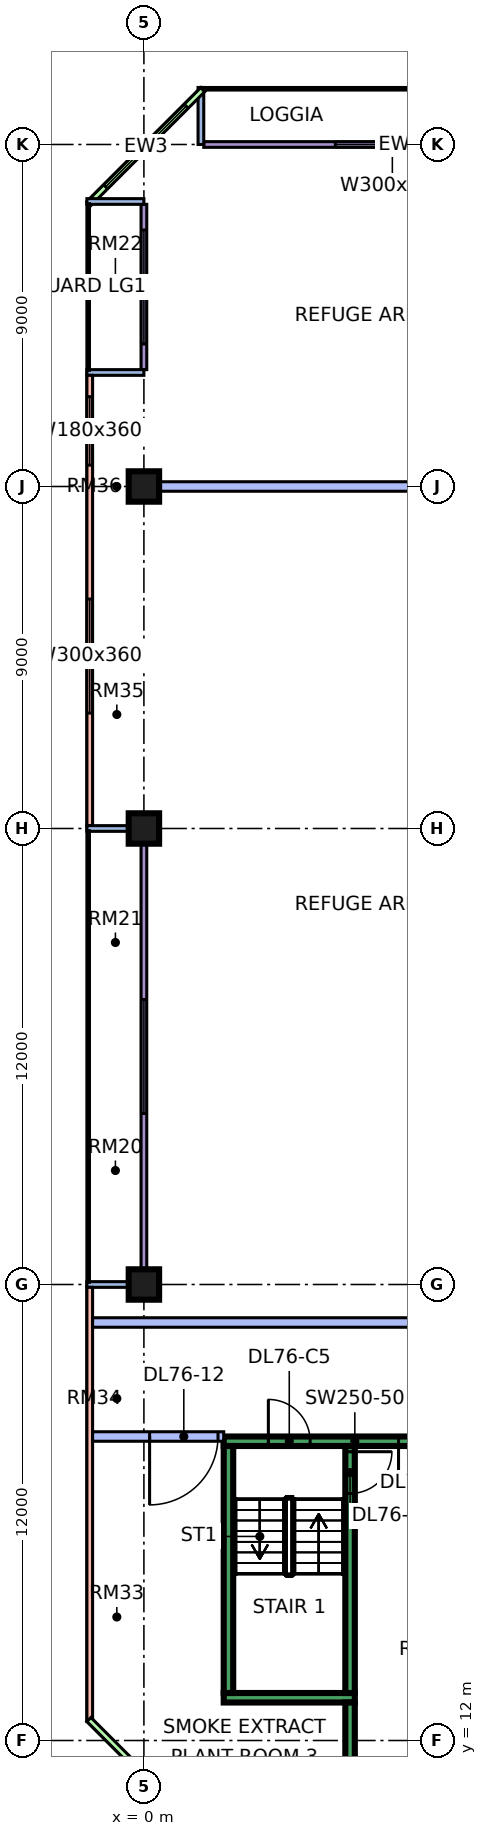
"""IFC4 building model, lengths in metres.
Left out: names, types, materials, properties, quantities, classifications, styles, units other than length and angle.
Written with IfcOpenShell. Run it as: python <this file> out.ifc"""

import sys

from ifc_helpers import new_model, si_unit, direction, frame, frame_2d, origin, origin_2d, place, context, subcontext, project, spatial, rectangle, extrude, element, fill, save


model = new_model("IFC4")
c1 = context("Model", 3, precision=1e-05, world=origin(), true_north=direction((0.0, 1.0)))
c2 = subcontext(c1, "Body", "Model", "MODEL_VIEW")
j1 = project(units=[si_unit("LENGTHUNIT", "METRE"), si_unit("PLANEANGLEUNIT", "RADIAN")], contexts=[c1])
p1 = place(None, origin())
s1 = spatial("IfcSite", under=j1, at=p1, CompositionType="ELEMENT")
p2 = place(p1, origin())
s2 = spatial("IfcBuilding", under=s1, at=p2, CompositionType="ELEMENT")
p3 = place(p2, frame((0.0, 0.0, 322.15)))
s3 = spatial("IfcBuildingStorey", under=s2, at=p3, CompositionType="ELEMENT", Elevation=322.15)
for number, where, z_axis, x_axis in (
    (1, (0.0, 24.0, 0.0), (0.0, 0.0, 1.0), (1.0, 0.0, 0.0)),
    (2, (0.0, 36.0, 0.0), (0.0, 0.0, 1.0), (1.0, 0.0, 0.0)),
):
    element("IfcColumn", number, at=place(p3, frame(where, z_axis=z_axis, x_axis=x_axis)), inside=s3, PredefinedType="COLUMN", context=c2, shape_type="SweptSolid", body=[
        extrude(rectangle(XDim=0.8, YDim=0.8, at=origin_2d()), origin(), (0.0, 0.0, 1.0), 5.5),
    ])
p4 = place(p3, frame((0.0, 45.0, 0.0), z_axis=(0.0, 0.0, 1.0), x_axis=(1.0, 0.0, 0.0)))
e3 = element("IfcColumn", 3, at=p4, inside=s3, PredefinedType="COLUMN", context=c2, shape_type="SweptSolid", body=[
    extrude(rectangle(XDim=0.8, YDim=0.8, at=origin_2d()), origin(), (0.0, 0.0, 1.0), 5.5),
])
p5 = place(p3, frame((2.1, 19.875, 0.0), z_axis=(0.0, 0.0, 1.0), x_axis=(1.0, 0.0, 0.0)))
e4 = element("IfcWall", 4, at=p5, inside=s3, PredefinedType="SHEAR", context=c2, shape_type="SweptSolid", body=[
    extrude(rectangle(XDim=6.9, YDim=0.25, at=frame_2d((3.45, 0.0))), origin(), (0.0, 0.0, 1.0), 5.5),
])
p6 = place(p5, frame((1.175, 0.0, 0.0)))
e5 = element("IfcOpeningElement", 5, at=p6, cuts=e4, PredefinedType="OPENING", context=c2, shape_type="SweptSolid", body=[
    extrude(rectangle(XDim=1.1, YDim=2.2, at=frame_2d((0.55, 1.1))), frame((0.0, 0.135, 0.0), z_axis=(0.0, -1.0, 0.0), x_axis=(1.0, 0.0, 0.0)), (0.0, 0.0, 1.0), 0.27),
])
p7 = place(p5, frame((4.6, 0.0, 0.0)))
e6 = element("IfcOpeningElement", 6, at=p7, cuts=e4, PredefinedType="OPENING", context=c2, shape_type="SweptSolid", body=[
    extrude(rectangle(XDim=1.2, YDim=2.2, at=frame_2d((0.6, 1.1))), frame((0.0, 0.135, 0.0), z_axis=(0.0, -1.0, 0.0), x_axis=(1.0, 0.0, 0.0)), (0.0, 0.0, 1.0), 0.27),
])
p8 = place(p3, frame((2.1, 13.125, 0.0), z_axis=(0.0, 0.0, 1.0), x_axis=(1.0, 0.0, 0.0)))
e7 = element("IfcWall", 7, at=p8, inside=s3, PredefinedType="SHEAR", context=c2, shape_type="SweptSolid", body=[
    extrude(rectangle(XDim=3.45, YDim=0.25, at=frame_2d((1.725, 0.0))), origin(), (0.0, 0.0, 1.0), 5.5),
])
p9 = place(p3, frame((2.225, 13.25, 0.0), z_axis=(0.0, 0.0, 1.0), x_axis=(0.0, 1.0, 0.0)))
e8 = element("IfcWall", 8, at=p9, inside=s3, PredefinedType="SHEAR", context=c2, shape_type="SweptSolid", body=[
    extrude(rectangle(XDim=6.5, YDim=0.25, at=frame_2d((3.25, 0.0))), origin(), (0.0, 0.0, 1.0), 5.5),
])
p10 = place(p3, frame((5.425, 13.25, 0.0), z_axis=(0.0, 0.0, 1.0), x_axis=(0.0, 1.0, 0.0)))
e9 = element("IfcWall", 9, at=p10, inside=s3, PredefinedType="SHEAR", context=c2, shape_type="SweptSolid", body=[
    extrude(rectangle(XDim=6.5, YDim=0.25, at=frame_2d((3.25, 0.0))), origin(), (0.0, 0.0, 1.0), 5.5),
])
p11 = place(p10, frame((5.25, 0.0, 0.0)))
e10 = element("IfcOpeningElement", 10, at=p11, cuts=e9, PredefinedType="OPENING", context=c2, shape_type="SweptSolid", body=[
    extrude(rectangle(XDim=1.1, YDim=2.2, at=frame_2d((0.55, 1.1))), frame((0.0, 0.135, 0.0), z_axis=(0.0, -1.0, 0.0), x_axis=(1.0, 0.0, 0.0)), (0.0, 0.0, 1.0), 0.27),
])
p12 = place(p3, frame((5.425, 9.0, 0.0), z_axis=(0.0, 0.0, 1.0), x_axis=(0.0, 1.0, 0.0)))
e11 = element("IfcWall", 11, at=p12, inside=s3, PredefinedType="SHEAR", context=c2, shape_type="SweptSolid", body=[
    extrude(rectangle(XDim=4.0, YDim=0.25, at=frame_2d((2.0, 0.0))), origin(), (0.0, 0.0, 1.0), 5.5),
])
p13 = place(p3, frame((11.925, 54.0, 0.0), z_axis=(0.0, 0.0, 1.0), x_axis=(-1.0, 0.0, 0.0)))
e12 = element("IfcWall", 12, at=p13, inside=s3, PredefinedType="SOLIDWALL", context=c2, shape_type="SweptSolid", body=[
    extrude(rectangle(XDim=10.35, YDim=0.15, at=frame_2d((5.175, 0.0))), origin(), (0.0, 0.0, 1.0), 5.05),
])
p14 = place(p13, frame((3.887, 0.0, 0.45)))
e13 = element("IfcOpeningElement", 13, at=p14, cuts=e12, PredefinedType="OPENING", context=c2, shape_type="SweptSolid", body=[
    extrude(rectangle(XDim=3.0, YDim=3.6, at=frame_2d((1.5, 1.8))), frame((0.0, 0.085, 0.0), z_axis=(0.0, -1.0, 0.0), x_axis=(1.0, 0.0, 0.0)), (0.0, 0.0, 1.0), 0.17),
])
p15 = place(p3, frame((1.5, 55.5, 0.0), z_axis=(0.0, 0.0, 1.0), x_axis=(0.0, -1.0, 0.0)))
e14 = element("IfcWall", 14, at=p15, inside=s3, PredefinedType="SOLIDWALL", context=c2, shape_type="SweptSolid", body=[
    extrude(rectangle(XDim=1.5, YDim=0.15, at=frame_2d((0.75, 0.0))), origin(), (0.0, 0.0, 1.0), 5.05),
])
p16 = place(p3, frame((1.553, 55.447, 0.0), z_axis=(0.0, 0.0, 1.0), x_axis=(-0.707106781187, -0.707106781187, 0.0)))
e15 = element("IfcWall", 15, at=p16, inside=s3, PredefinedType="SOLIDWALL", context=c2, shape_type="SweptSolid", body=[
    extrude(rectangle(XDim=4.243, YDim=0.15, at=frame_2d((2.121, 0.0))), origin(), (0.0, 0.0, 1.0), 5.05),
])
p17 = place(p16, frame((0.621, 0.0, 0.45)))
e16 = element("IfcOpeningElement", 16, at=p17, cuts=e15, PredefinedType="OPENING", context=c2, shape_type="SweptSolid", body=[
    extrude(rectangle(XDim=3.0, YDim=3.6, at=frame_2d((1.5, 1.8))), frame((0.0, 0.085, 0.0), z_axis=(0.0, -1.0, 0.0), x_axis=(1.0, 0.0, 0.0)), (0.0, 0.0, 1.0), 0.17),
])
p18 = place(p3, frame((0.0, 52.425, 0.0), z_axis=(0.0, 0.0, 1.0), x_axis=(0.0, -1.0, 0.0)))
e17 = element("IfcWall", 17, at=p18, inside=s3, PredefinedType="SOLIDWALL", context=c2, shape_type="SweptSolid", body=[
    extrude(rectangle(XDim=4.35, YDim=0.15, at=frame_2d((2.175, 0.0))), origin(), (0.0, 0.0, 1.0), 5.05),
])
p19 = place(p18, frame((0.675, 0.0, 0.45)))
e18 = element("IfcOpeningElement", 18, at=p19, cuts=e17, PredefinedType="OPENING", context=c2, shape_type="SweptSolid", body=[
    extrude(rectangle(XDim=3.0, YDim=3.6, at=frame_2d((1.5, 1.8))), frame((0.0, 0.085, 0.0), z_axis=(0.0, -1.0, 0.0), x_axis=(1.0, 0.0, 0.0)), (0.0, 0.0, 1.0), 0.17),
])
for number, where, z_axis, x_axis in (
    (19, (-1.5, 52.5, 0.0), (0.0, 0.0, 1.0), (1.0, 0.0, 0.0)),
    (20, (-1.5, 48.0, 0.0), (0.0, 0.0, 1.0), (1.0, 0.0, 0.0)),
):
    element("IfcWall", number, at=place(p3, frame(where, z_axis=z_axis, x_axis=x_axis)), inside=s3, PredefinedType="SOLIDWALL", context=c2, shape_type="SweptSolid", body=[
        extrude(rectangle(XDim=1.5, YDim=0.15, at=frame_2d((0.75, 0.0))), origin(), (0.0, 0.0, 1.0), 5.05),
    ])
p20 = place(p3, frame((-1.425, 47.925, 0.0), z_axis=(0.0, 0.0, 1.0), x_axis=(0.0, -1.0, 0.0)))
e21 = element("IfcWall", 21, at=p20, inside=s3, PredefinedType="SOLIDWALL", context=c2, shape_type="SweptSolid", body=[
    extrude(rectangle(XDim=11.85, YDim=0.15, at=frame_2d((5.925, 0.0))), origin(), (0.0, 0.0, 1.0), 5.05),
])
p21 = place(p20, frame((0.562, 0.0, 0.45)))
e22 = element("IfcOpeningElement", 22, at=p21, cuts=e21, PredefinedType="OPENING", context=c2, shape_type="SweptSolid", body=[
    extrude(rectangle(XDim=1.8, YDim=3.6, at=frame_2d((0.9, 1.8))), frame((0.0, 0.085, 0.0), z_axis=(0.0, -1.0, 0.0), x_axis=(1.0, 0.0, 0.0)), (0.0, 0.0, 1.0), 0.17),
])
p22 = place(p20, frame((5.887, 0.0, 0.45)))
e23 = element("IfcOpeningElement", 23, at=p22, cuts=e21, PredefinedType="OPENING", context=c2, shape_type="SweptSolid", body=[
    extrude(rectangle(XDim=3.0, YDim=3.6, at=frame_2d((1.5, 1.8))), frame((0.0, 0.085, 0.0), z_axis=(0.0, -1.0, 0.0), x_axis=(1.0, 0.0, 0.0)), (0.0, 0.0, 1.0), 0.17),
])
p23 = place(p3, frame((0.0, 35.925, 0.0), z_axis=(0.0, 0.0, 1.0), x_axis=(0.0, -1.0, 0.0)))
e24 = element("IfcWall", 24, at=p23, inside=s3, PredefinedType="SOLIDWALL", context=c2, shape_type="SweptSolid", body=[
    extrude(rectangle(XDim=11.85, YDim=0.15, at=frame_2d((5.925, 0.0))), origin(), (0.0, 0.0, 1.0), 5.05),
])
p24 = place(p23, frame((4.425, 0.0, 0.45)))
e25 = element("IfcOpeningElement", 25, at=p24, cuts=e24, PredefinedType="OPENING", context=c2, shape_type="SweptSolid", body=[
    extrude(rectangle(XDim=3.0, YDim=3.6, at=frame_2d((1.5, 1.8))), frame((0.0, 0.085, 0.0), z_axis=(0.0, -1.0, 0.0), x_axis=(1.0, 0.0, 0.0)), (0.0, 0.0, 1.0), 0.17),
])
for number, where, z_axis, x_axis in (
    (26, (-1.5, 36.0, 0.0), (0.0, 0.0, 1.0), (1.0, 0.0, 0.0)),
    (27, (-1.5, 24.0, 0.0), (0.0, 0.0, 1.0), (1.0, 0.0, 0.0)),
):
    element("IfcWall", number, at=place(p3, frame(where, z_axis=z_axis, x_axis=x_axis)), inside=s3, PredefinedType="SOLIDWALL", context=c2, shape_type="SweptSolid", body=[
        extrude(rectangle(XDim=1.5, YDim=0.15, at=frame_2d((0.75, 0.0))), origin(), (0.0, 0.0, 1.0), 5.05),
    ])
p25 = place(p3, frame((-1.425, 23.925, 0.0), z_axis=(0.0, 0.0, 1.0), x_axis=(0.0, -1.0, 0.0)))
e28 = element("IfcWall", 28, at=p25, inside=s3, PredefinedType="SOLIDWALL", context=c2, shape_type="SweptSolid", body=[
    extrude(rectangle(XDim=11.425, YDim=0.15, at=frame_2d((5.712, 0.0))), origin(), (0.0, 0.0, 1.0), 5.05),
])
p26 = place(p3, frame((-1.447, 12.553, 0.0), z_axis=(0.0, 0.0, 1.0), x_axis=(0.707106781187, -0.707106781187, 0.0)))
e29 = element("IfcWall", 29, at=p26, inside=s3, PredefinedType="SOLIDWALL", context=c2, shape_type="SweptSolid", body=[
    extrude(rectangle(XDim=19.799, YDim=0.15, at=frame_2d((9.899, 0.0))), origin(), (0.0, 0.0, 1.0), 5.05),
])
p27 = place(p26, frame((11.453, 0.0, 0.45)))
e30 = element("IfcOpeningElement", 30, at=p27, cuts=e29, PredefinedType="OPENING", context=c2, shape_type="SweptSolid", body=[
    extrude(rectangle(XDim=3.0, YDim=3.6, at=frame_2d((1.5, 1.8))), frame((0.0, 0.085, 0.0), z_axis=(0.0, -1.0, 0.0), x_axis=(1.0, 0.0, 0.0)), (0.0, 0.0, 1.0), 0.17),
])
p28 = place(p3, frame((-1.35, 20.0, 0.0), z_axis=(0.0, 0.0, 1.0), x_axis=(1.0, 0.0, 0.0)))
e31 = element("IfcWall", 31, at=p28, inside=s3, PredefinedType="PARTITIONING", context=c2, shape_type="SweptSolid", body=[
    extrude(rectangle(XDim=3.45, YDim=0.25, at=frame_2d((1.725, 0.0))), origin(), (0.0, 0.0, 1.0), 5.05),
])
p29 = place(p28, frame((1.5, 0.0, 0.0)))
e32 = element("IfcOpeningElement", 32, at=p29, cuts=e31, PredefinedType="OPENING", context=c2, shape_type="SweptSolid", body=[
    extrude(rectangle(XDim=1.8, YDim=2.1, at=frame_2d((0.9, 1.05))), frame((0.0, 0.135, 0.0), z_axis=(0.0, -1.0, 0.0), x_axis=(1.0, 0.0, 0.0)), (0.0, 0.0, 1.0), 0.27),
])
p30 = place(p3, frame((-1.35, 23.0, 0.0), z_axis=(0.0, 0.0, 1.0), x_axis=(1.0, 0.0, 0.0)))
e33 = element("IfcWall", 33, at=p30, inside=s3, PredefinedType="PARTITIONING", context=c2, shape_type="SweptSolid", body=[
    extrude(rectangle(XDim=13.225, YDim=0.25, at=frame_2d((6.613, 0.0))), origin(), (0.0, 0.0, 1.0), 5.05),
])
e34 = element("IfcWall", 34, at=p4, inside=s3, PredefinedType="PARTITIONING", context=c2, shape_type="SweptSolid", body=[
    extrude(rectangle(XDim=11.875, YDim=0.25, at=frame_2d((5.938, 0.0))), origin(), (0.0, 0.0, 1.0), 5.05),
])
p31 = place(p14, origin())
e35 = element("IfcWindow", 35, at=p31, inside=s3, PartitioningType="SINGLE_PANEL", PredefinedType="WINDOW", context=c2, shape_type="SweptSolid", body=[
    extrude(rectangle(XDim=3.0, YDim=3.6, at=frame_2d((1.5, 1.8))), frame((0.0, 0.03, 0.0), z_axis=(0.0, -1.0, 0.0), x_axis=(1.0, 0.0, 0.0)), (0.0, 0.0, 1.0), 0.06),
])
fill(e13, e35)
p32 = place(p17, origin())
e36 = element("IfcWindow", 36, at=p32, inside=s3, PartitioningType="SINGLE_PANEL", PredefinedType="WINDOW", context=c2, shape_type="SweptSolid", body=[
    extrude(rectangle(XDim=3.0, YDim=3.6, at=frame_2d((1.5, 1.8))), frame((0.0, 0.03, 0.0), z_axis=(0.0, -1.0, 0.0), x_axis=(1.0, 0.0, 0.0)), (0.0, 0.0, 1.0), 0.06),
])
fill(e16, e36)
p33 = place(p19, origin())
e37 = element("IfcWindow", 37, at=p33, inside=s3, PartitioningType="SINGLE_PANEL", PredefinedType="WINDOW", context=c2, shape_type="SweptSolid", body=[
    extrude(rectangle(XDim=3.0, YDim=3.6, at=frame_2d((1.5, 1.8))), frame((0.0, 0.03, 0.0), z_axis=(0.0, -1.0, 0.0), x_axis=(1.0, 0.0, 0.0)), (0.0, 0.0, 1.0), 0.06),
])
fill(e18, e37)
p34 = place(p21, origin())
e38 = element("IfcWindow", 38, at=p34, inside=s3, PartitioningType="SINGLE_PANEL", PredefinedType="WINDOW", context=c2, shape_type="SweptSolid", body=[
    extrude(rectangle(XDim=1.8, YDim=3.6, at=frame_2d((0.9, 1.8))), frame((0.0, 0.03, 0.0), z_axis=(0.0, -1.0, 0.0), x_axis=(1.0, 0.0, 0.0)), (0.0, 0.0, 1.0), 0.06),
])
fill(e22, e38)
p35 = place(p22, origin())
e39 = element("IfcWindow", 39, at=p35, inside=s3, PartitioningType="SINGLE_PANEL", PredefinedType="WINDOW", context=c2, shape_type="SweptSolid", body=[
    extrude(rectangle(XDim=3.0, YDim=3.6, at=frame_2d((1.5, 1.8))), frame((0.0, 0.03, 0.0), z_axis=(0.0, -1.0, 0.0), x_axis=(1.0, 0.0, 0.0)), (0.0, 0.0, 1.0), 0.06),
])
fill(e23, e39)
p36 = place(p24, origin())
e40 = element("IfcWindow", 40, at=p36, inside=s3, PartitioningType="SINGLE_PANEL", PredefinedType="WINDOW", context=c2, shape_type="SweptSolid", body=[
    extrude(rectangle(XDim=3.0, YDim=3.6, at=frame_2d((1.5, 1.8))), frame((0.0, 0.03, 0.0), z_axis=(0.0, -1.0, 0.0), x_axis=(1.0, 0.0, 0.0)), (0.0, 0.0, 1.0), 0.06),
])
fill(e25, e40)
p37 = place(p11, origin())
e41 = element("IfcDoor", 41, at=p37, inside=s3, OperationType="SINGLE_SWING_RIGHT", PredefinedType="DOOR", context=c2, shape_type="SweptSolid", body=[
    extrude(rectangle(XDim=1.1, YDim=2.2, at=frame_2d((0.55, 1.1))), frame((0.0, 0.025, 0.0), z_axis=(0.0, -1.0, 0.0), x_axis=(1.0, 0.0, 0.0)), (0.0, 0.0, 1.0), 0.05),
])
fill(e10, e41)
p38 = place(p6, origin())
e42 = element("IfcDoor", 42, at=p38, inside=s3, OperationType="SINGLE_SWING_LEFT", PredefinedType="DOOR", context=c2, shape_type="SweptSolid", body=[
    extrude(rectangle(XDim=1.1, YDim=2.2, at=frame_2d((0.55, 1.1))), frame((0.0, 0.025, 0.0), z_axis=(0.0, -1.0, 0.0), x_axis=(1.0, 0.0, 0.0)), (0.0, 0.0, 1.0), 0.05),
])
fill(e5, e42)
p39 = place(p7, frame((1.2, 0.0, 0.0), z_axis=(0.0, 0.0, 1.0), x_axis=(-1.0, 0.0, 0.0)))
e43 = element("IfcDoor", 43, at=p39, inside=s3, OperationType="SINGLE_SWING_LEFT", PredefinedType="DOOR", context=c2, shape_type="SweptSolid", body=[
    extrude(rectangle(XDim=1.2, YDim=2.2, at=frame_2d((0.6, 1.1))), frame((0.0, 0.025, 0.0), z_axis=(0.0, -1.0, 0.0), x_axis=(1.0, 0.0, 0.0)), (0.0, 0.0, 1.0), 0.05),
])
fill(e6, e43)
p40 = place(p29, frame((1.8, 0.0, 0.0), z_axis=(0.0, 0.0, 1.0), x_axis=(-1.0, 0.0, 0.0)))
e44 = element("IfcDoor", 44, at=p40, inside=s3, OperationType="DOUBLE_DOOR_SINGLE_SWING", PredefinedType="DOOR", context=c2, shape_type="SweptSolid", body=[
    extrude(rectangle(XDim=1.8, YDim=2.1, at=frame_2d((0.9, 1.05))), frame((0.0, 0.025, 0.0), z_axis=(0.0, -1.0, 0.0), x_axis=(1.0, 0.0, 0.0)), (0.0, 0.0, 1.0), 0.05),
])
fill(e32, e44)
save(model, sys.argv[1])
